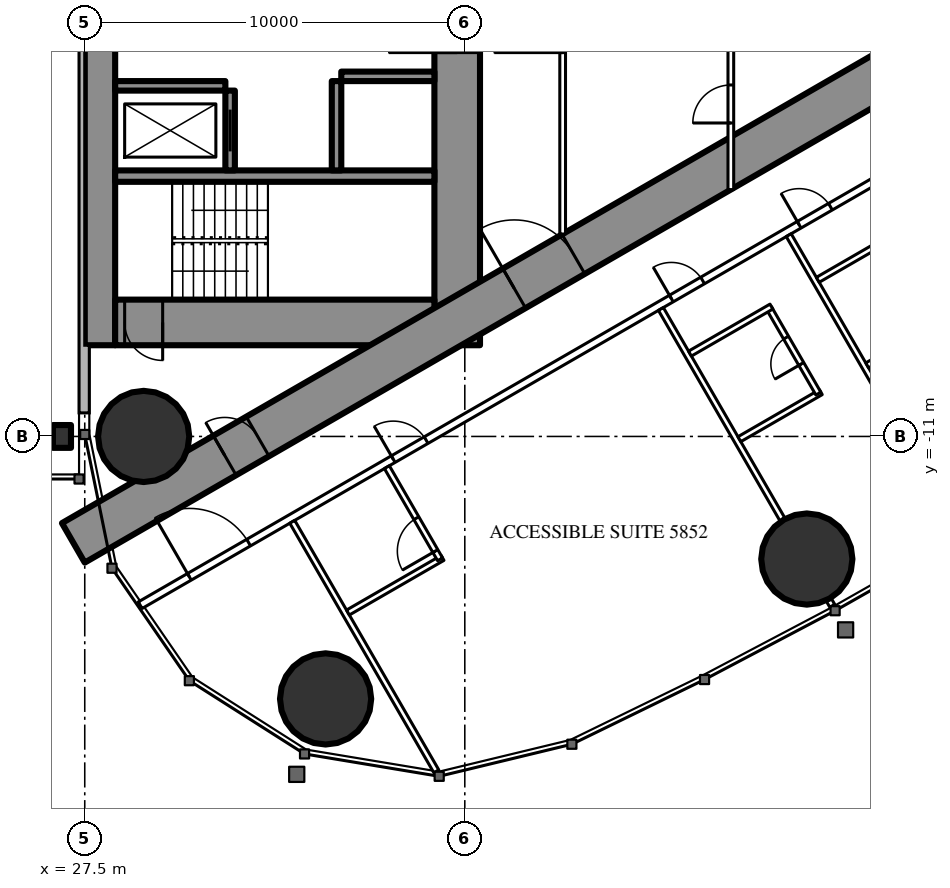
"""IFC4 building model, lengths in metres.
Left out: names, types, materials, properties, quantities, classifications, styles, units other than length and angle.
Written with IfcOpenShell. Run it as: python <this file> out.ifc"""

import sys

from ifc_helpers import new_model, si_unit, direction, frame, frame_2d, origin, origin_2d, place, context, subcontext, project, spatial, rectangle, circle, i_section, extrude, element, fill, save


model = new_model("IFC4")
c1 = context("Model", 3, precision=1e-05, world=origin(), true_north=direction((0.0, 1.0)))
c2 = subcontext(c1, "Body", "Model", "MODEL_VIEW")
j1 = project(units=[si_unit("LENGTHUNIT", "METRE"), si_unit("PLANEANGLEUNIT", "RADIAN")], contexts=[c1])
p1 = place(None, origin())
s1 = spatial("IfcSite", under=j1, at=p1, CompositionType="ELEMENT")
p2 = place(p1, origin())
s2 = spatial("IfcBuilding", under=s1, at=p2, CompositionType="ELEMENT")
p3 = place(p2, frame((0.0, 0.0, 218.9)))
s3 = spatial("IfcBuildingStorey", under=s2, at=p3, CompositionType="ELEMENT", Elevation=218.9)
for number, where, z_axis, x_axis in (
    (1, (33.837, -17.906, 0.0), (0.0, 0.0, 1.0), (1.0, 0.0, 0.0)),
    (2, (29.05, -11.0, 0.0), (0.0, 0.0, 1.0), (1.0, 0.0, 0.0)),
    (3, (46.499, -14.226, 0.0), (0.0, 0.0, 1.0), (1.0, 0.0, 0.0)),
):
    element("IfcColumn", number, at=place(p3, frame(where, z_axis=z_axis, x_axis=x_axis)), inside=s3, PredefinedType="COLUMN", context=c2, shape_type="SweptSolid", body=[
        extrude(circle(Radius=1.2, at=origin_2d()), origin(), (0.0, 0.0, 1.0), 3.6),
    ])
p4 = place(p3, frame((27.9, -8.6, 0.0), z_axis=(0.0, 0.0, 1.0), x_axis=(0.0, 1.0, 0.0)))
e4 = element("IfcWall", 4, at=p4, inside=s3, PredefinedType="SHEAR", context=c2, shape_type="SweptSolid", body=[
    extrude(rectangle(XDim=17.2, YDim=0.8, at=frame_2d((8.6, 0.0))), origin(), (0.0, 0.0, 1.0), 3.6),
])
p5 = place(p4, frame((9.35, 0.0, 0.0)))
e5 = element("IfcOpeningElement", 5, at=p5, cuts=e4, PredefinedType="OPENING", context=c2, shape_type="SweptSolid", body=[
    extrude(rectangle(XDim=0.9, YDim=2.2, at=frame_2d((0.45, 1.1))), frame((0.0, 0.41, 0.0), z_axis=(0.0, -1.0, 0.0), x_axis=(1.0, 0.0, 0.0)), (0.0, 0.0, 1.0), 0.82),
])
p6 = place(p3, frame((37.3, -8.6, 0.0), z_axis=(0.0, 0.0, 1.0), x_axis=(0.0, 1.0, 0.0)))
e6 = element("IfcWall", 6, at=p6, inside=s3, PredefinedType="SHEAR", context=c2, shape_type="SweptSolid", body=[
    extrude(rectangle(XDim=17.2, YDim=1.2, at=frame_2d((8.6, 0.0))), origin(), (0.0, 0.0, 1.0), 3.6),
])
p7 = place(p6, frame((7.7, 0.0, 0.0)))
e7 = element("IfcOpeningElement", 7, at=p7, cuts=e6, PredefinedType="OPENING", context=c2, shape_type="SweptSolid", body=[
    extrude(rectangle(XDim=1.8, YDim=2.2, at=frame_2d((0.9, 1.1))), frame((0.0, 0.61, 0.0), z_axis=(0.0, -1.0, 0.0), x_axis=(1.0, 0.0, 0.0)), (0.0, 0.0, 1.0), 1.22),
])
p8 = place(p3, frame((28.3, -8.0, 0.0), z_axis=(0.0, 0.0, 1.0), x_axis=(1.0, 0.0, 0.0)))
e8 = element("IfcWall", 8, at=p8, inside=s3, PredefinedType="SHEAR", context=c2, shape_type="SweptSolid", body=[
    extrude(rectangle(XDim=8.4, YDim=1.2, at=frame_2d((4.2, 0.0))), origin(), (0.0, 0.0, 1.0), 3.6),
])
p9 = place(p8, frame((0.25, 0.0, 0.0)))
e9 = element("IfcOpeningElement", 9, at=p9, cuts=e8, PredefinedType="OPENING", context=c2, shape_type="SweptSolid", body=[
    extrude(rectangle(XDim=1.0, YDim=2.2, at=frame_2d((0.5, 1.1))), frame((0.0, 0.61, 0.0), z_axis=(0.0, -1.0, 0.0), x_axis=(1.0, 0.0, 0.0)), (0.0, 0.0, 1.0), 1.22),
])
p10 = place(p3, frame((28.3, -4.15, 0.0), z_axis=(0.0, 0.0, 1.0), x_axis=(1.0, 0.0, 0.0)))
e10 = element("IfcWall", 10, at=p10, inside=s3, PredefinedType="SHEAR", context=c2, shape_type="SweptSolid", body=[
    extrude(rectangle(XDim=8.4, YDim=0.3, at=frame_2d((4.2, 0.0))), origin(), (0.0, 0.0, 1.0), 3.6),
])
p11 = place(p3, frame((31.325, -4.0, 0.0), z_axis=(0.0, 0.0, 1.0), x_axis=(0.0, 1.0, 0.0)))
e11 = element("IfcWall", 11, at=p11, inside=s3, PredefinedType="SHEAR", context=c2, shape_type="SweptSolid", body=[
    extrude(rectangle(XDim=2.1, YDim=0.25, at=frame_2d((1.05, 0.0))), origin(), (0.0, 0.0, 1.0), 3.6),
])
p12 = place(p11, frame((0.5, 0.0, 0.0)))
e12 = element("IfcOpeningElement", 12, at=p12, cuts=e11, PredefinedType="OPENING", context=c2, shape_type="SweptSolid", body=[
    extrude(rectangle(XDim=1.1, YDim=2.2, at=frame_2d((0.55, 1.1))), frame((0.0, 0.135, 0.0), z_axis=(0.0, -1.0, 0.0), x_axis=(1.0, 0.0, 0.0)), (0.0, 0.0, 1.0), 0.27),
])
p13 = place(p3, frame((34.125, -4.0, 0.0), z_axis=(0.0, 0.0, 1.0), x_axis=(0.0, 1.0, 0.0)))
e13 = element("IfcWall", 13, at=p13, inside=s3, PredefinedType="SHEAR", context=c2, shape_type="SweptSolid", body=[
    extrude(rectangle(XDim=2.35, YDim=0.25, at=frame_2d((1.175, 0.0))), origin(), (0.0, 0.0, 1.0), 3.6),
])
p14 = place(p3, frame((28.3, -1.775, 0.0), z_axis=(0.0, 0.0, 1.0), x_axis=(1.0, 0.0, 0.0)))
e14 = element("IfcWall", 14, at=p14, inside=s3, PredefinedType="SHEAR", context=c2, shape_type="SweptSolid", body=[
    extrude(rectangle(XDim=2.9, YDim=0.25, at=frame_2d((1.45, 0.0))), origin(), (0.0, 0.0, 1.0), 3.6),
])
p15 = place(p3, frame((34.25, -1.525, 0.0), z_axis=(0.0, 0.0, 1.0), x_axis=(1.0, 0.0, 0.0)))
e15 = element("IfcWall", 15, at=p15, inside=s3, PredefinedType="SHEAR", context=c2, shape_type="SweptSolid", body=[
    extrude(rectangle(XDim=2.45, YDim=0.25, at=frame_2d((1.225, 0.0))), origin(), (0.0, 0.0, 1.0), 3.6),
])
p16 = place(p3, frame((27.2, -13.8, 0.0), z_axis=(0.0, 0.0, 1.0), x_axis=(0.866027159892, 0.499996958321, 0.0)))
e16 = element("IfcWall", 16, at=p16, inside=s3, PredefinedType="SHEAR", context=c2, shape_type="SweptSolid", body=[
    extrude(rectangle(XDim=27.947, YDim=1.2, at=frame_2d((13.973, 0.0))), origin(), (0.0, 0.0, 1.0), 3.6),
])
p17 = place(p16, frame((4.6, 0.0, 0.0)))
e17 = element("IfcOpeningElement", 17, at=p17, cuts=e16, PredefinedType="OPENING", context=c2, shape_type="SweptSolid", body=[
    extrude(rectangle(XDim=1.0, YDim=2.2, at=frame_2d((0.5, 1.1))), frame((0.0, 0.61, 0.0), z_axis=(0.0, -1.0, 0.0), x_axis=(1.0, 0.0, 0.0)), (0.0, 0.0, 1.0), 1.22),
])
p18 = place(p16, frame((13.395, 0.0, 0.0)))
e18 = element("IfcOpeningElement", 18, at=p18, cuts=e16, PredefinedType="OPENING", context=c2, shape_type="SweptSolid", body=[
    extrude(rectangle(XDim=1.8, YDim=2.2, at=frame_2d((0.9, 1.1))), frame((0.0, 0.61, 0.0), z_axis=(0.0, -1.0, 0.0), x_axis=(1.0, 0.0, 0.0)), (0.0, 0.0, 1.0), 1.22),
])
p19 = place(p3, frame((26.9, -11.0, 0.0), z_axis=(0.0, 0.0, 1.0), x_axis=(1.0, 0.0, 0.0)))
e19 = element("IfcColumn", 19, at=p19, inside=s3, PredefinedType="COLUMN", context=c2, shape_type="SweptSolid", body=[
    extrude(i_section(OverallWidth=0.476, OverallDepth=0.6, WebThickness=0.1, FlangeThickness=0.14, FilletRadius=0.02, at=origin_2d()), origin(), (0.0, 0.0, 1.0), 3.6),
])
p20 = place(p3, frame((28.959, -15.44, 0.0), z_axis=(0.0, 0.0, 1.0), x_axis=(0.866025227435, 0.500000305447, 0.0)))
e20 = element("IfcWall", 20, at=p20, inside=s3, PredefinedType="PARTITIONING", context=c2, shape_type="SweptSolid", body=[
    extrude(rectangle(XDim=30.88, YDim=0.2, at=frame_2d((15.44, 0.0))), origin(), (0.0, 0.0, 1.0), 3.35),
])
p21 = place(p20, frame((1.494, 0.0, 0.0)))
e21 = element("IfcOpeningElement", 21, at=p21, cuts=e20, PredefinedType="OPENING", context=c2, shape_type="SweptSolid", body=[
    extrude(rectangle(XDim=1.8, YDim=2.03, at=frame_2d((0.9, 1.015))), frame((0.0, 0.11, 0.0), z_axis=(0.0, -1.0, 0.0), x_axis=(1.0, 0.0, 0.0)), (0.0, 0.0, 1.0), 0.22),
])
p22 = place(p20, frame((7.687, 0.0, 0.0)))
e22 = element("IfcOpeningElement", 22, at=p22, cuts=e20, PredefinedType="OPENING", context=c2, shape_type="SweptSolid", body=[
    extrude(rectangle(XDim=1.0, YDim=2.2, at=frame_2d((0.5, 1.1))), frame((0.0, 0.11, 0.0), z_axis=(0.0, -1.0, 0.0), x_axis=(1.0, 0.0, 0.0)), (0.0, 0.0, 1.0), 0.22),
])
p23 = place(p20, frame((16.137, 0.0, 0.0)))
e23 = element("IfcOpeningElement", 23, at=p23, cuts=e20, PredefinedType="OPENING", context=c2, shape_type="SweptSolid", body=[
    extrude(rectangle(XDim=0.95, YDim=2.2, at=frame_2d((0.475, 1.1))), frame((0.0, 0.11, 0.0), z_axis=(0.0, -1.0, 0.0), x_axis=(1.0, 0.0, 0.0)), (0.0, 0.0, 1.0), 0.22),
])
p24 = place(p20, frame((20.021, 0.0, 0.0)))
e24 = element("IfcOpeningElement", 24, at=p24, cuts=e20, PredefinedType="OPENING", context=c2, shape_type="SweptSolid", body=[
    extrude(rectangle(XDim=0.95, YDim=2.2, at=frame_2d((0.475, 1.1))), frame((0.0, 0.11, 0.0), z_axis=(0.0, -1.0, 0.0), x_axis=(1.0, 0.0, 0.0)), (0.0, 0.0, 1.0), 0.22),
])
p25 = place(p20, frame((26.253, 0.0, 0.0)))
e25 = element("IfcOpeningElement", 25, at=p25, cuts=e20, PredefinedType="OPENING", context=c2, shape_type="SweptSolid", body=[
    extrude(rectangle(XDim=0.95, YDim=2.2, at=frame_2d((0.475, 1.1))), frame((0.0, 0.11, 0.0), z_axis=(0.0, -1.0, 0.0), x_axis=(1.0, 0.0, 0.0)), (0.0, 0.0, 1.0), 0.22),
])
p26 = place(p3, frame((32.96, -13.246, 0.0), z_axis=(0.0, 0.0, 1.0), x_axis=(0.500000236886, -0.866025267018, 0.0)))
e26 = element("IfcWall", 26, at=p26, inside=s3, PredefinedType="PARTITIONING", context=c2, shape_type="SweptSolid", body=[
    extrude(rectangle(XDim=7.583, YDim=0.15, at=frame_2d((3.791, 0.0))), origin(), (0.0, 0.0, 1.0), 3.35),
])
p27 = place(p3, frame((42.66, -7.646, 0.0), z_axis=(0.0, 0.0, 1.0), x_axis=(0.499996592859, -0.866027370889, 0.0)))
e27 = element("IfcWall", 27, at=p27, inside=s3, PredefinedType="PARTITIONING", context=c2, shape_type="SweptSolid", body=[
    extrude(rectangle(XDim=6.398, YDim=0.15, at=frame_2d((3.199, 0.0))), origin(), (0.0, 0.0, 1.0), 2.45),
])
p28 = place(p3, frame((47.079, -15.3, 0.0), z_axis=(0.0, 0.0, 1.0), x_axis=(0.499212083968, -0.866479829667, 0.0)))
e28 = element("IfcWall", 28, at=p28, inside=s3, PredefinedType="PARTITIONING", context=c2, shape_type="SweptSolid", body=[
    extrude(rectangle(XDim=0.179, YDim=0.15, at=frame_2d((0.09, 0.0))), origin(), (0.0, 0.0, 1.0), 2.45),
])
p29 = place(p3, frame((46.023, -5.704, 0.0), z_axis=(0.0, 0.0, 1.0), x_axis=(0.499984478165, -0.866034365135, 0.0)))
e29 = element("IfcWall", 29, at=p29, inside=s3, PredefinedType="PARTITIONING", context=c2, shape_type="SweptSolid", body=[
    extrude(rectangle(XDim=6.426, YDim=0.15, at=frame_2d((3.213, 0.0))), origin(), (0.0, 0.0, 1.0), 2.45),
])
p30 = place(p3, frame((34.425, -15.633, 0.0), z_axis=(0.0, 0.0, 1.0), x_axis=(0.866018712932, 0.500011588718, 0.0)))
e30 = element("IfcWall", 30, at=p30, inside=s3, PredefinedType="PARTITIONING", context=c2, shape_type="SweptSolid", body=[
    extrude(rectangle(XDim=2.875, YDim=0.15, at=frame_2d((1.438, 0.0))), origin(), (0.0, 0.0, 1.0), 3.35),
])
p31 = place(p3, frame((35.45, -11.808, 0.0), z_axis=(0.0, 0.0, 1.0), x_axis=(0.49994636267, -0.866056369097, 0.0)))
e31 = element("IfcWall", 31, at=p31, inside=s3, PredefinedType="PARTITIONING", context=c2, shape_type="SweptSolid", body=[
    extrude(rectangle(XDim=2.8, YDim=0.15, at=frame_2d((1.4, 0.0))), origin(), (0.0, 0.0, 1.0), 3.35),
])
p32 = place(p31, frame((1.55, 0.0, 0.0)))
e32 = element("IfcOpeningElement", 32, at=p32, cuts=e31, PredefinedType="OPENING", context=c2, shape_type="SweptSolid", body=[
    extrude(rectangle(XDim=1.0, YDim=2.2, at=frame_2d((0.5, 1.1))), frame((0.0, 0.085, 0.0), z_axis=(0.0, -1.0, 0.0), x_axis=(1.0, 0.0, 0.0)), (0.0, 0.0, 1.0), 0.17),
])
p33 = place(p3, frame((44.725, -11.072, 0.0), z_axis=(0.0, 0.0, 1.0), x_axis=(0.866006523861, 0.500032699561, 0.0)))
e33 = element("IfcWall", 33, at=p33, inside=s3, PredefinedType="PARTITIONING", context=c2, shape_type="SweptSolid", body=[
    extrude(rectangle(XDim=2.475, YDim=0.15, at=frame_2d((1.237, 0.0))), origin(), (0.0, 0.0, 1.0), 3.35),
])
p34 = place(p3, frame((45.503, -7.621, 0.0), z_axis=(0.0, 0.0, 1.0), x_axis=(0.500006934395, -0.866021400173, 0.0)))
e34 = element("IfcWall", 34, at=p34, inside=s3, PredefinedType="PARTITIONING", context=c2, shape_type="SweptSolid", body=[
    extrude(rectangle(XDim=2.6, YDim=0.15, at=frame_2d((1.3, 0.0))), origin(), (0.0, 0.0, 1.0), 3.35),
])
p35 = place(p34, frame((0.9, 0.0, 0.0)))
e35 = element("IfcOpeningElement", 35, at=p35, cuts=e34, PredefinedType="OPENING", context=c2, shape_type="SweptSolid", body=[
    extrude(rectangle(XDim=0.8, YDim=2.2, at=frame_2d((0.4, 1.1))), frame((0.0, 0.085, 0.0), z_axis=(0.0, -1.0, 0.0), x_axis=(1.0, 0.0, 0.0)), (0.0, 0.0, 1.0), 0.17),
])
for number, where, z_axis, x_axis in (
    (36, (43.425, -8.821, 0.0), (0.0, 0.0, 1.0), (0.866, 0.5, 0.0)),
    (37, (48.088, -9.13, 0.0), (0.0, 0.0, 1.0), (0.866, 0.5, 0.0)),
    (38, (46.788, -6.879, 0.0), (0.0, 0.0, 1.0), (0.866, 0.5, 0.0)),
):
    element("IfcWall", number, at=place(p3, frame(where, z_axis=z_axis, x_axis=x_axis)), inside=s3, PredefinedType="PARTITIONING", context=c2, shape_type="SweptSolid", body=[
        extrude(rectangle(XDim=2.475, YDim=0.15, at=frame_2d((1.237, 0.0))), origin(), (0.0, 0.0, 1.0), 3.35),
    ])
p36 = place(p3, frame((40.075, -5.674, 0.0), z_axis=(0.0, 0.0, 1.0), x_axis=(0.0, 1.0, 0.0)))
e39 = element("IfcWall", 39, at=p36, inside=s3, PredefinedType="PARTITIONING", context=c2, shape_type="SweptSolid", body=[
    extrude(rectangle(XDim=11.348, YDim=0.15, at=frame_2d((5.674, 0.0))), origin(), (0.0, 0.0, 1.0), 3.35),
])
p37 = place(p36, frame((4.774, 0.0, 0.0)))
e40 = element("IfcOpeningElement", 40, at=p37, cuts=e39, PredefinedType="OPENING", context=c2, shape_type="SweptSolid", body=[
    extrude(rectangle(XDim=1.8, YDim=2.2, at=frame_2d((0.9, 1.1))), frame((0.0, 0.085, 0.0), z_axis=(0.0, -1.0, 0.0), x_axis=(1.0, 0.0, 0.0)), (0.0, 0.0, 1.0), 0.17),
])
p38 = place(p3, frame((44.5, -4.505, 0.0), z_axis=(0.0, 0.0, 1.0), x_axis=(0.0, 1.0, 0.0)))
e41 = element("IfcWall", 41, at=p38, inside=s3, PredefinedType="PARTITIONING", context=c2, shape_type="SweptSolid", body=[
    extrude(rectangle(XDim=9.009, YDim=0.15, at=frame_2d((4.505, 0.0))), origin(), (0.0, 0.0, 1.0), 3.35),
])
p39 = place(p38, frame((1.752, 0.0, 0.0)))
e42 = element("IfcOpeningElement", 42, at=p39, cuts=e41, PredefinedType="OPENING", context=c2, shape_type="SweptSolid", body=[
    extrude(rectangle(XDim=1.0, YDim=2.2, at=frame_2d((0.5, 1.1))), frame((0.0, 0.085, 0.0), z_axis=(0.0, -1.0, 0.0), x_axis=(1.0, 0.0, 0.0)), (0.0, 0.0, 1.0), 0.17),
])
p40 = place(p38, frame((6.257, 0.0, 0.0)))
e43 = element("IfcOpeningElement", 43, at=p40, cuts=e41, PredefinedType="OPENING", context=c2, shape_type="SweptSolid", body=[
    extrude(rectangle(XDim=1.0, YDim=2.2, at=frame_2d((0.5, 1.1))), frame((0.0, 0.085, 0.0), z_axis=(0.0, -1.0, 0.0), x_axis=(1.0, 0.0, 0.0)), (0.0, 0.0, 1.0), 0.17),
])
p41 = place(p21, origin())
e44 = element("IfcDoor", 44, at=p41, inside=s3, OperationType="DOUBLE_DOOR_SINGLE_SWING", PredefinedType="DOOR", context=c2, shape_type="SweptSolid", body=[
    extrude(rectangle(XDim=1.8, YDim=2.03, at=frame_2d((0.9, 1.015))), frame((0.0, 0.025, 0.0), z_axis=(0.0, -1.0, 0.0), x_axis=(1.0, 0.0, 0.0)), (0.0, 0.0, 1.0), 0.05),
])
fill(e21, e44)
p42 = place(p32, origin())
e45 = element("IfcDoor", 45, at=p42, inside=s3, OperationType="SINGLE_SWING_RIGHT", PredefinedType="DOOR", context=c2, shape_type="SweptSolid", body=[
    extrude(rectangle(XDim=1.0, YDim=2.2, at=frame_2d((0.5, 1.1))), frame((0.0, 0.025, 0.0), z_axis=(0.0, -1.0, 0.0), x_axis=(1.0, 0.0, 0.0)), (0.0, 0.0, 1.0), 0.05),
])
fill(e32, e45)
p43 = place(p22, origin())
e46 = element("IfcDoor", 46, at=p43, inside=s3, OperationType="SINGLE_SWING_LEFT", PredefinedType="DOOR", context=c2, shape_type="SweptSolid", body=[
    extrude(rectangle(XDim=1.0, YDim=2.2, at=frame_2d((0.5, 1.1))), frame((0.0, 0.025, 0.0), z_axis=(0.0, -1.0, 0.0), x_axis=(1.0, 0.0, 0.0)), (0.0, 0.0, 1.0), 0.05),
])
fill(e22, e46)
p44 = place(p35, origin())
e47 = element("IfcDoor", 47, at=p44, inside=s3, OperationType="SINGLE_SWING_RIGHT", PredefinedType="DOOR", context=c2, shape_type="SweptSolid", body=[
    extrude(rectangle(XDim=0.8, YDim=2.2, at=frame_2d((0.4, 1.1))), frame((0.0, 0.025, 0.0), z_axis=(0.0, -1.0, 0.0), x_axis=(1.0, 0.0, 0.0)), (0.0, 0.0, 1.0), 0.05),
])
fill(e35, e47)
p45 = place(p23, origin())
e48 = element("IfcDoor", 48, at=p45, inside=s3, OperationType="SINGLE_SWING_LEFT", PredefinedType="DOOR", context=c2, shape_type="SweptSolid", body=[
    extrude(rectangle(XDim=0.95, YDim=2.2, at=frame_2d((0.475, 1.1))), frame((0.0, 0.025, 0.0), z_axis=(0.0, -1.0, 0.0), x_axis=(1.0, 0.0, 0.0)), (0.0, 0.0, 1.0), 0.05),
])
fill(e23, e48)
p46 = place(p24, origin())
e49 = element("IfcDoor", 49, at=p46, inside=s3, OperationType="SINGLE_SWING_LEFT", PredefinedType="DOOR", context=c2, shape_type="SweptSolid", body=[
    extrude(rectangle(XDim=0.95, YDim=2.2, at=frame_2d((0.475, 1.1))), frame((0.0, 0.025, 0.0), z_axis=(0.0, -1.0, 0.0), x_axis=(1.0, 0.0, 0.0)), (0.0, 0.0, 1.0), 0.05),
])
fill(e24, e49)
p47 = place(p37, origin())
e50 = element("IfcDoor", 50, at=p47, inside=s3, OperationType="DOUBLE_DOOR_SINGLE_SWING", PredefinedType="DOOR", context=c2, shape_type="SweptSolid", body=[
    extrude(rectangle(XDim=1.8, YDim=2.2, at=frame_2d((0.9, 1.1))), frame((0.0, 0.025, 0.0), z_axis=(0.0, -1.0, 0.0), x_axis=(1.0, 0.0, 0.0)), (0.0, 0.0, 1.0), 0.05),
])
fill(e40, e50)
p48 = place(p39, origin())
e51 = element("IfcDoor", 51, at=p48, inside=s3, OperationType="SINGLE_SWING_LEFT", PredefinedType="DOOR", context=c2, shape_type="SweptSolid", body=[
    extrude(rectangle(XDim=1.0, YDim=2.2, at=frame_2d((0.5, 1.1))), frame((0.0, 0.025, 0.0), z_axis=(0.0, -1.0, 0.0), x_axis=(1.0, 0.0, 0.0)), (0.0, 0.0, 1.0), 0.05),
])
fill(e42, e51)
p49 = place(p17, origin())
e52 = element("IfcDoor", 52, at=p49, inside=s3, OperationType="SINGLE_SWING_LEFT", PredefinedType="DOOR", context=c2, shape_type="SweptSolid", body=[
    extrude(rectangle(XDim=1.0, YDim=2.2, at=frame_2d((0.5, 1.1))), frame((0.0, 0.025, 0.0), z_axis=(0.0, -1.0, 0.0), x_axis=(1.0, 0.0, 0.0)), (0.0, 0.0, 1.0), 0.05),
])
fill(e17, e52)
p50 = place(p18, origin())
e53 = element("IfcDoor", 53, at=p50, inside=s3, OperationType="DOUBLE_DOOR_SINGLE_SWING", PredefinedType="DOOR", context=c2, shape_type="SweptSolid", body=[
    extrude(rectangle(XDim=1.8, YDim=2.2, at=frame_2d((0.9, 1.1))), frame((0.0, 0.025, 0.0), z_axis=(0.0, -1.0, 0.0), x_axis=(1.0, 0.0, 0.0)), (0.0, 0.0, 1.0), 0.05),
])
fill(e18, e53)
p51 = place(p7, origin())
e54 = element("IfcDoor", 54, at=p51, inside=s3, OperationType="DOUBLE_DOOR_SINGLE_SWING", PredefinedType="DOOR", context=c2, shape_type="SweptSolid", body=[
    extrude(rectangle(XDim=1.8, YDim=2.2, at=frame_2d((0.9, 1.1))), frame((0.0, 0.025, 0.0), z_axis=(0.0, -1.0, 0.0), x_axis=(1.0, 0.0, 0.0)), (0.0, 0.0, 1.0), 0.05),
])
fill(e7, e54)
p52 = place(p9, origin())
e55 = element("IfcDoor", 55, at=p52, inside=s3, OperationType="SINGLE_SWING_RIGHT", PredefinedType="DOOR", context=c2, shape_type="SweptSolid", body=[
    extrude(rectangle(XDim=1.0, YDim=2.2, at=frame_2d((0.5, 1.1))), frame((0.0, 0.025, 0.0), z_axis=(0.0, -1.0, 0.0), x_axis=(1.0, 0.0, 0.0)), (0.0, 0.0, 1.0), 0.05),
])
fill(e9, e55)
p53 = place(p12, origin())
e56 = element("IfcDoor", 56, at=p53, inside=s3, OperationType="SLIDING_TO_LEFT", PredefinedType="USERDEFINED", context=c2, shape_type="SweptSolid", body=[
    extrude(rectangle(XDim=1.1, YDim=2.2, at=frame_2d((0.55, 1.1))), frame((0.0, 0.025, 0.0), z_axis=(0.0, -1.0, 0.0), x_axis=(1.0, 0.0, 0.0)), (0.0, 0.0, 1.0), 0.05),
])
fill(e12, e56)
save(model, sys.argv[1])
